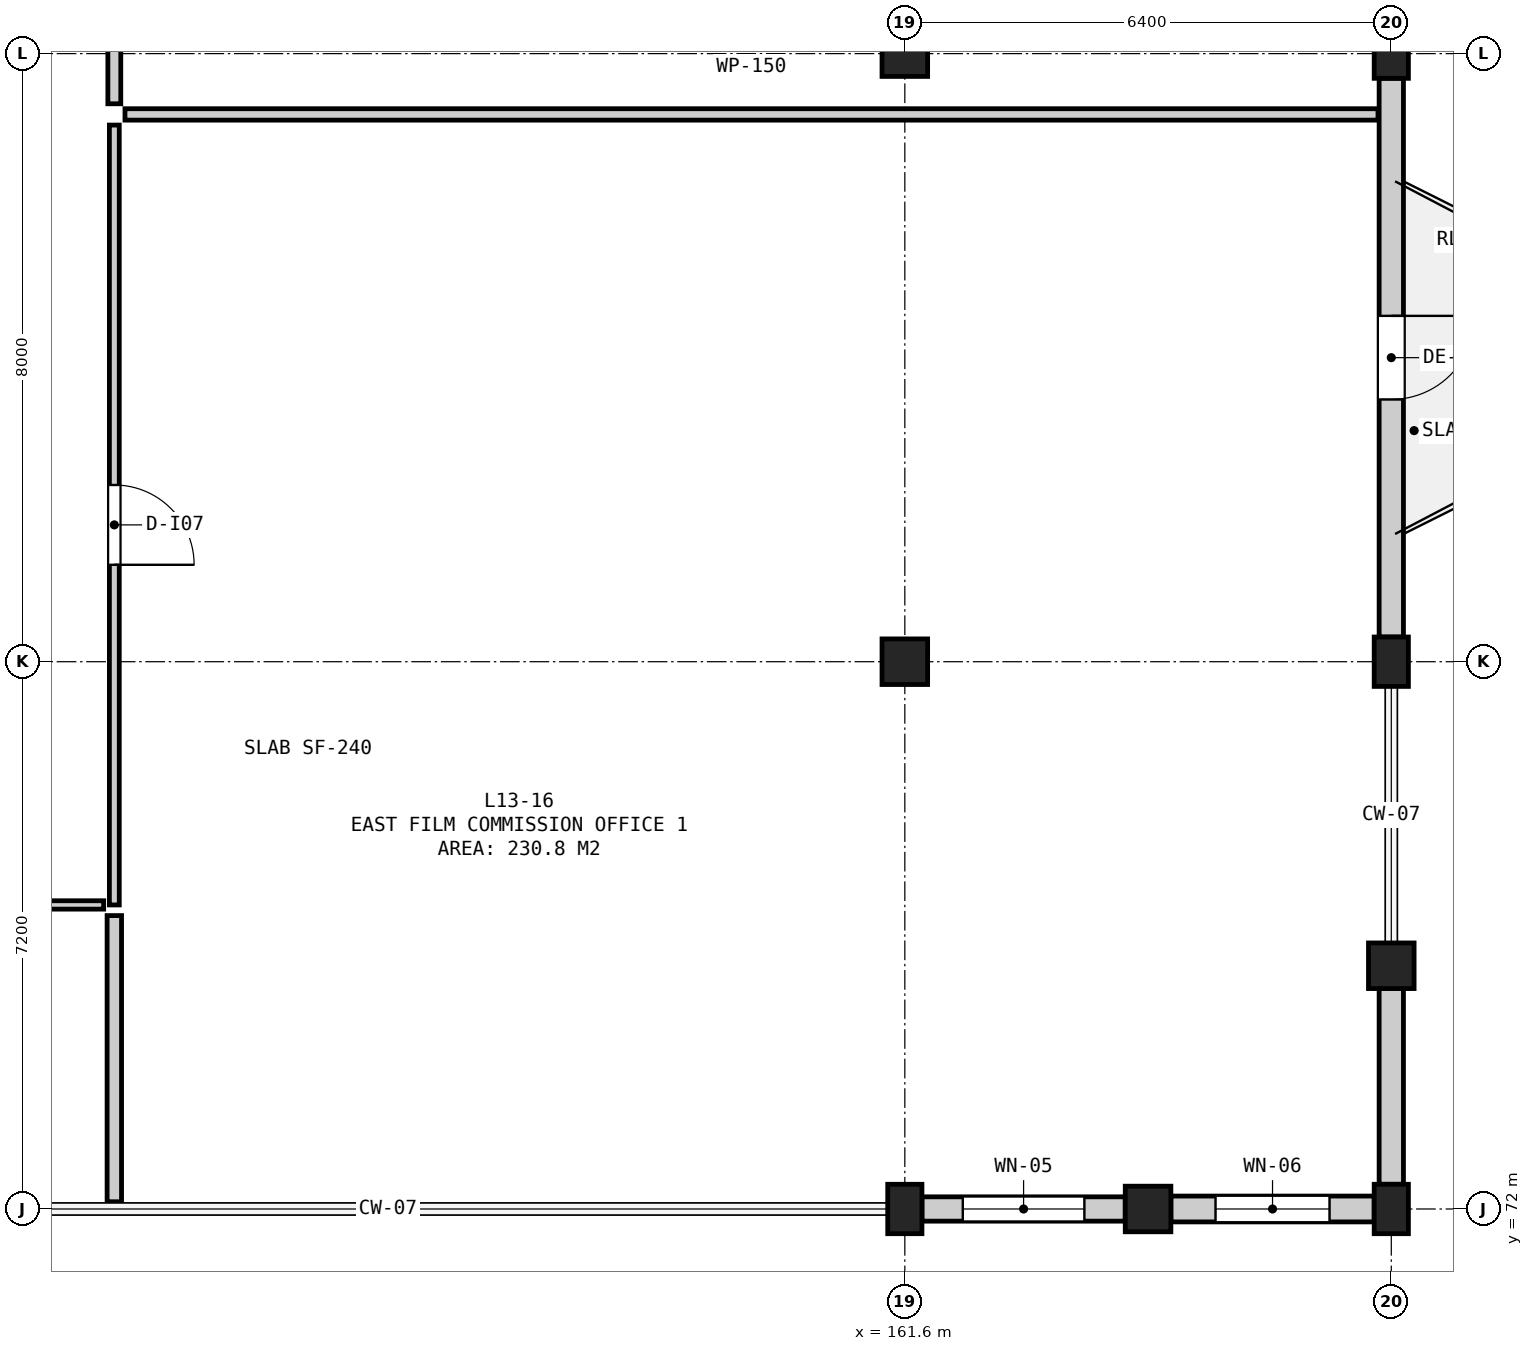
"""IFC4 building model, lengths in metres.
Left out: names, types, materials, properties, quantities, classifications, styles, units other than length and angle.
Written with IfcOpenShell. Run it as: python <this file> out.ifc"""

import sys

from ifc_helpers import new_model, si_unit, direction, frame, frame_2d, origin, origin_2d, place, context, subcontext, project, spatial, rectangle, circle, extrude, element, fill, save


model = new_model("IFC4")
c1 = context("Model", 3, precision=1e-05, world=origin(), true_north=direction((0.0, 1.0)))
c2 = subcontext(c1, "Body", "Model", "MODEL_VIEW")
j1 = project(units=[si_unit("LENGTHUNIT", "METRE"), si_unit("PLANEANGLEUNIT", "RADIAN")], contexts=[c1])
p1 = place(None, origin())
s1 = spatial("IfcSite", under=j1, at=p1, CompositionType="ELEMENT")
p2 = place(p1, origin())
s2 = spatial("IfcBuilding", under=s1, at=p2, CompositionType="ELEMENT")
p3 = place(p2, frame((0.0, 0.0, 54.8)))
s3 = spatial("IfcBuildingStorey", under=s2, at=p3, CompositionType="ELEMENT", Elevation=54.8)
p4 = place(p3, frame((161.6, 72.0, 0.0), z_axis=(0.0, 0.0, 1.0), x_axis=(1.0, 0.0, 0.0)))
e1 = element("IfcColumn", 1, at=p4, inside=s3, PredefinedType="COLUMN", context=c2, shape_type="SweptSolid", body=[
    extrude(rectangle(XDim=0.45, YDim=0.65, at=origin_2d()), origin(), (0.0, 0.0, 1.0), 3.9),
])
for number, where, z_axis, x_axis in (
    (2, (161.6, 79.2, 0.0), (0.0, 0.0, 1.0), (1.0, 0.0, 0.0)),
    (3, (161.6, 87.2, 0.0), (0.0, 0.0, 1.0), (1.0, 0.0, 0.0)),
):
    element("IfcColumn", number, at=place(p3, frame(where, z_axis=z_axis, x_axis=x_axis)), inside=s3, PredefinedType="COLUMN", context=c2, shape_type="SweptSolid", body=[
        extrude(rectangle(XDim=0.6, YDim=0.6, at=origin_2d()), origin(), (0.0, 0.0, 1.0), 3.9),
    ])
p5 = place(p3, frame((164.8, 72.0, 0.0), z_axis=(0.0, 0.0, 1.0), x_axis=(1.0, 0.0, 0.0)))
e4 = element("IfcColumn", 4, at=p5, inside=s3, PredefinedType="COLUMN", context=c2, shape_type="SweptSolid", body=[
    extrude(circle(Radius=0.3, at=origin_2d()), origin(), (0.0, 0.0, 1.0), 3.9),
])
p6 = place(p3, frame((168.0, 72.0, 0.0), z_axis=(0.0, 0.0, 1.0), x_axis=(1.0, 0.0, 0.0)))
e5 = element("IfcColumn", 5, at=p6, inside=s3, PredefinedType="COLUMN", context=c2, shape_type="SweptSolid", body=[
    extrude(rectangle(XDim=0.45, YDim=0.65, at=origin_2d()), origin(), (0.0, 0.0, 1.0), 3.9),
])
p7 = place(p3, frame((168.0, 75.2, 0.0), z_axis=(0.0, 0.0, 1.0), x_axis=(1.0, 0.0, 0.0)))
e6 = element("IfcColumn", 6, at=p7, inside=s3, PredefinedType="COLUMN", context=c2, shape_type="SweptSolid", body=[
    extrude(circle(Radius=0.3, at=origin_2d()), origin(), (0.0, 0.0, 1.0), 3.9),
])
for number, where, z_axis, x_axis in (
    (7, (168.0, 79.2, 0.0), (0.0, 0.0, 1.0), (1.0, 0.0, 0.0)),
    (8, (168.0, 87.2, 0.0), (0.0, 0.0, 1.0), (1.0, 0.0, 0.0)),
):
    element("IfcColumn", number, at=place(p3, frame(where, z_axis=z_axis, x_axis=x_axis)), inside=s3, PredefinedType="COLUMN", context=c2, shape_type="SweptSolid", body=[
        extrude(rectangle(XDim=0.45, YDim=0.65, at=origin_2d()), origin(), (0.0, 0.0, 1.0), 3.9),
    ])
p8 = place(p3, frame((161.825, 72.0, 0.0), z_axis=(0.0, 0.0, 1.0), x_axis=(1.0, 0.0, 0.0)))
e9 = element("IfcWall", 9, at=p8, inside=s3, PredefinedType="SOLIDWALL", context=c2, shape_type="SweptSolid", body=[
    extrude(rectangle(XDim=2.675, YDim=0.32, at=frame_2d((1.337, 0.0))), origin(), (0.0, 0.0, 1.0), 3.06),
])
p9 = place(p8, frame((0.538, 0.0, 0.9)))
e10 = element("IfcOpeningElement", 10, at=p9, cuts=e9, PredefinedType="OPENING", context=c2, shape_type="SweptSolid", body=[
    extrude(rectangle(XDim=1.6, YDim=1.95, at=frame_2d((0.8, 0.975))), frame((0.0, 0.172, 0.0), z_axis=(0.0, -1.0, 0.0), x_axis=(1.0, 0.0, 0.0)), (0.0, 0.0, 1.0), 0.344),
])
p10 = place(p3, frame((165.1, 72.0, 0.0), z_axis=(0.0, 0.0, 1.0), x_axis=(1.0, 0.0, 0.0)))
e11 = element("IfcWall", 11, at=p10, inside=s3, PredefinedType="SOLIDWALL", context=c2, shape_type="SweptSolid", body=[
    extrude(rectangle(XDim=2.675, YDim=0.34, at=frame_2d((1.337, 0.0))), origin(), (0.0, 0.0, 1.0), 3.06),
])
p11 = place(p10, frame((0.587, 0.0, 0.9)))
e12 = element("IfcOpeningElement", 12, at=p11, cuts=e11, PredefinedType="OPENING", context=c2, shape_type="SweptSolid", body=[
    extrude(rectangle(XDim=1.5, YDim=1.85, at=frame_2d((0.75, 0.925))), frame((0.0, 0.182, 0.0), z_axis=(0.0, -1.0, 0.0), x_axis=(1.0, 0.0, 0.0)), (0.0, 0.0, 1.0), 0.364),
])
p12 = place(p3, frame((168.0, 72.325, 0.0), z_axis=(0.0, 0.0, 1.0), x_axis=(0.0, 1.0, 0.0)))
e13 = element("IfcWall", 13, at=p12, inside=s3, PredefinedType="SOLIDWALL", context=c2, shape_type="SweptSolid", body=[
    extrude(rectangle(XDim=2.575, YDim=0.32, at=frame_2d((1.288, 0.0))), origin(), (0.0, 0.0, 1.0), 3.06),
])
p13 = place(p3, frame((168.0, 79.525, 0.0), z_axis=(0.0, 0.0, 1.0), x_axis=(0.0, 1.0, 0.0)))
e14 = element("IfcWall", 14, at=p13, inside=s3, PredefinedType="SOLIDWALL", context=c2, shape_type="SweptSolid", body=[
    extrude(rectangle(XDim=7.35, YDim=0.32, at=frame_2d((3.675, 0.0))), origin(), (0.0, 0.0, 1.0), 3.045),
])
p14 = place(p13, frame((3.125, 0.0, 0.0)))
e15 = element("IfcOpeningElement", 15, at=p14, cuts=e14, PredefinedType="OPENING", context=c2, shape_type="SweptSolid", body=[
    extrude(rectangle(XDim=1.1, YDim=2.2, at=frame_2d((0.55, 1.1))), frame((0.0, 0.172, 0.0), z_axis=(0.0, -1.0, 0.0), x_axis=(1.0, 0.0, 0.0)), (0.0, 0.0, 1.0), 0.344),
])
p15 = place(p3, frame((116.895, 76.0, 0.0), z_axis=(0.0, 0.0, 1.0), x_axis=(1.0, 0.0, 0.0)))
e16 = element("IfcWall", 16, at=p15, inside=s3, PredefinedType="PARTITIONING", context=c2, shape_type="SweptSolid", body=[
    extrude(rectangle(XDim=34.165, YDim=0.11, at=frame_2d((17.083, 0.0))), origin(), (0.0, 0.0, 1.0), 3.62),
])
p16 = place(p15, frame((18.58, 0.0, 0.0)))
e17 = element("IfcOpeningElement", 17, at=p16, cuts=e16, PredefinedType="OPENING", context=c2, shape_type="SweptSolid", body=[
    extrude(rectangle(XDim=1.05, YDim=2.15, at=frame_2d((0.525, 1.075))), frame((0.0, 0.067, 0.0), z_axis=(0.0, -1.0, 0.0), x_axis=(1.0, 0.0, 0.0)), (0.0, 0.0, 1.0), 0.134),
])
p17 = place(p3, frame((151.2, 72.095, 0.0), z_axis=(0.0, 0.0, 1.0), x_axis=(0.0, 1.0, 0.0)))
e18 = element("IfcWall", 18, at=p17, inside=s3, PredefinedType="PARTITIONING", context=c2, shape_type="SweptSolid", body=[
    extrude(rectangle(XDim=3.765, YDim=0.19, at=frame_2d((1.883, 0.0))), origin(), (0.0, 0.0, 1.0), 3.62),
])
p18 = place(p3, frame((151.34, 86.4, 0.0), z_axis=(0.0, 0.0, 1.0), x_axis=(1.0, 0.0, 0.0)))
e19 = element("IfcWall", 19, at=p18, inside=s3, PredefinedType="PARTITIONING", context=c2, shape_type="SweptSolid", body=[
    extrude(rectangle(XDim=16.485, YDim=0.15, at=frame_2d((8.242, 0.0))), origin(), (0.0, 0.0, 1.0), 3.62),
])
p19 = place(p3, frame((151.2, 76.0, 0.0), z_axis=(0.0, 0.0, 1.0), x_axis=(0.0, 1.0, 0.0)))
e20 = element("IfcWall", 20, at=p19, inside=s3, PredefinedType="PARTITIONING", context=c2, shape_type="SweptSolid", body=[
    extrude(rectangle(XDim=10.26, YDim=0.13, at=frame_2d((5.13, 0.0))), origin(), (0.0, 0.0, 1.0), 3.62),
])
p20 = place(p19, frame((4.475, 0.0, 0.0)))
e21 = element("IfcOpeningElement", 21, at=p20, cuts=e20, PredefinedType="OPENING", context=c2, shape_type="SweptSolid", body=[
    extrude(rectangle(XDim=1.05, YDim=2.15, at=frame_2d((0.525, 1.075))), frame((0.0, 0.077, 0.0), z_axis=(0.0, -1.0, 0.0), x_axis=(1.0, 0.0, 0.0)), (0.0, 0.0, 1.0), 0.154),
])
p21 = place(p3, frame((151.2, 86.54, 0.0), z_axis=(0.0, 0.0, 1.0), x_axis=(0.0, 1.0, 0.0)))
e22 = element("IfcWall", 22, at=p21, inside=s3, PredefinedType="PARTITIONING", context=c2, shape_type="SweptSolid", body=[
    extrude(rectangle(XDim=11.72, YDim=0.17, at=frame_2d((5.86, 0.0))), origin(), (0.0, 0.0, 1.0), 3.62),
])
p22 = place(p21, frame((5.135, 0.0, 0.0)))
e23 = element("IfcOpeningElement", 23, at=p22, cuts=e22, PredefinedType="OPENING", context=c2, shape_type="SweptSolid", body=[
    extrude(rectangle(XDim=1.05, YDim=2.15, at=frame_2d((0.525, 1.075))), frame((0.0, 0.097, 0.0), z_axis=(0.0, -1.0, 0.0), x_axis=(1.0, 0.0, 0.0)), (0.0, 0.0, 1.0), 0.194),
])
p23 = place(p9, origin())
e24 = element("IfcWindow", 24, at=p23, inside=s3, PartitioningType="DOUBLE_PANEL_VERTICAL", PredefinedType="WINDOW", context=c2, shape_type="SweptSolid", body=[
    extrude(rectangle(XDim=1.6, YDim=1.95, at=frame_2d((0.8, 0.975))), frame((0.0, 0.03, 0.0), z_axis=(0.0, -1.0, 0.0), x_axis=(1.0, 0.0, 0.0)), (0.0, 0.0, 1.0), 0.06),
])
fill(e10, e24)
p24 = place(p11, origin())
e25 = element("IfcWindow", 25, at=p24, inside=s3, PartitioningType="SINGLE_PANEL", PredefinedType="WINDOW", context=c2, shape_type="SweptSolid", body=[
    extrude(rectangle(XDim=1.5, YDim=1.85, at=frame_2d((0.75, 0.925))), frame((0.0, 0.03, 0.0), z_axis=(0.0, -1.0, 0.0), x_axis=(1.0, 0.0, 0.0)), (0.0, 0.0, 1.0), 0.06),
])
fill(e12, e25)
p25 = place(p14, frame((1.1, 0.0, 0.0), z_axis=(0.0, 0.0, 1.0), x_axis=(-1.0, 0.0, 0.0)))
e26 = element("IfcDoor", 26, at=p25, inside=s3, OperationType="SINGLE_SWING_LEFT", PredefinedType="DOOR", context=c2, shape_type="SweptSolid", body=[
    extrude(rectangle(XDim=1.1, YDim=2.2, at=frame_2d((0.55, 1.1))), frame((0.0, 0.025, 0.0), z_axis=(0.0, -1.0, 0.0), x_axis=(1.0, 0.0, 0.0)), (0.0, 0.0, 1.0), 0.05),
])
fill(e15, e26)
p26 = place(p20, frame((1.05, 0.0, 0.0), z_axis=(0.0, 0.0, 1.0), x_axis=(-1.0, 0.0, 0.0)))
e27 = element("IfcDoor", 27, at=p26, inside=s3, OperationType="SINGLE_SWING_RIGHT", PredefinedType="DOOR", context=c2, shape_type="SweptSolid", body=[
    extrude(rectangle(XDim=1.05, YDim=2.15, at=frame_2d((0.525, 1.075))), frame((0.0, 0.025, 0.0), z_axis=(0.0, -1.0, 0.0), x_axis=(1.0, 0.0, 0.0)), (0.0, 0.0, 1.0), 0.05),
])
fill(e21, e27)
save(model, sys.argv[1])
